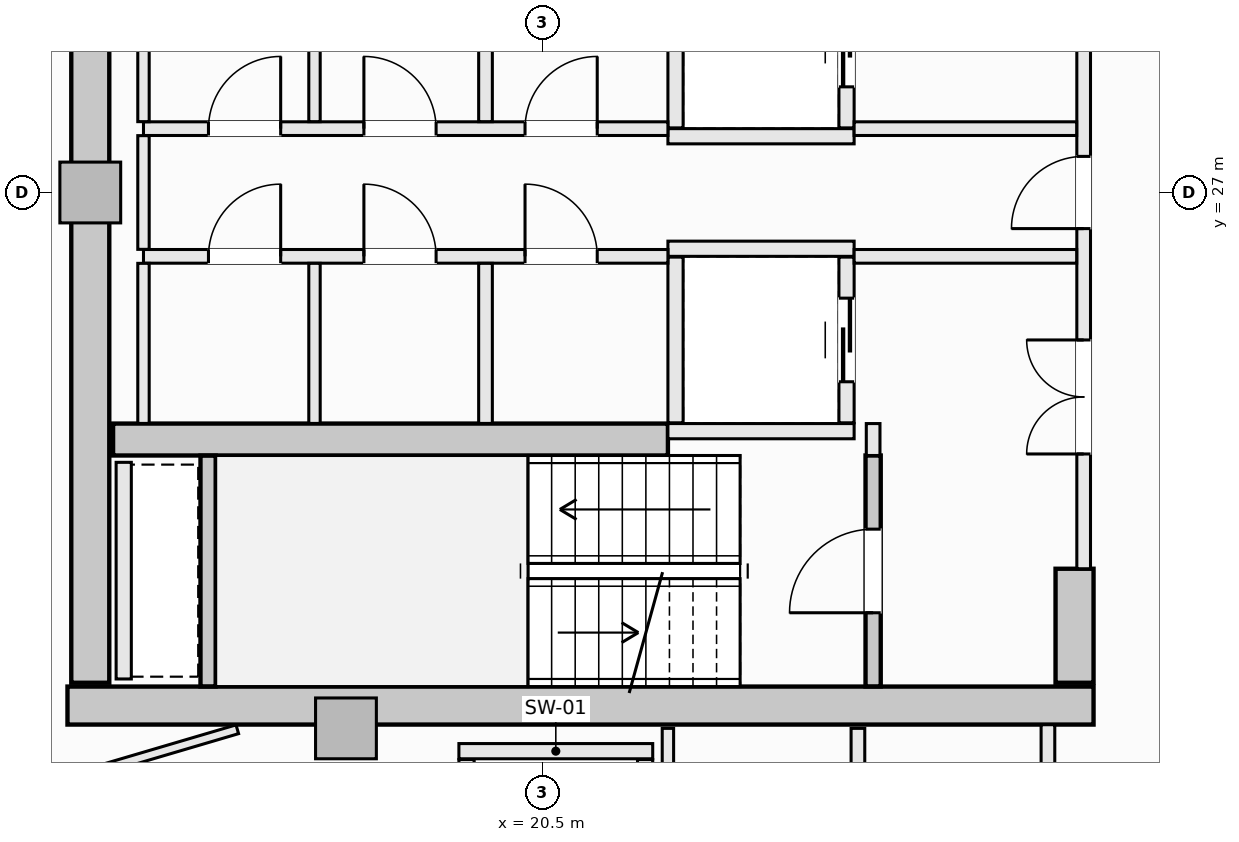
"""IFC4 building model, lengths in metres.
Left out: names, types, materials, properties, quantities, classifications, styles, units other than length and angle.
Written with IfcOpenShell. Run it as: python <this file> out.ifc"""

import sys

from ifc_helpers import new_model, si_unit, direction, frame, frame_2d, origin, origin_2d, place, context, subcontext, project, spatial, rectangle, extrude, element, fill, save


model = new_model("IFC4")
c1 = context("Model", 3, precision=1e-05, world=origin(), true_north=direction((0.0, 1.0)))
c2 = subcontext(c1, "Body", "Model", "MODEL_VIEW")
j1 = project(units=[si_unit("LENGTHUNIT", "METRE"), si_unit("PLANEANGLEUNIT", "RADIAN")], contexts=[c1])
p1 = place(None, origin())
s1 = spatial("IfcSite", under=j1, at=p1, CompositionType="ELEMENT")
p2 = place(p1, origin())
s2 = spatial("IfcBuilding", under=s1, at=p2, CompositionType="ELEMENT")
p3 = place(p2, frame((0.0, 0.0, 242.6)))
s3 = spatial("IfcBuildingStorey", under=s2, at=p3, CompositionType="ELEMENT", Elevation=242.6)
p4 = place(p3, frame((14.25, 20.25, -0.27), z_axis=(0.0, 0.0, 1.0), x_axis=(1.0, 0.0, 0.0)))
e1 = element("IfcWall", 1, at=p4, inside=s3, PredefinedType="SHEAR", context=c2, shape_type="SweptSolid", body=[
    extrude(rectangle(XDim=13.5, YDim=0.5, at=frame_2d((6.75, 0.0))), origin(), (0.0, 0.0, 1.0), 3.3),
])
p5 = place(p3, frame((14.55, 20.55, -0.27), z_axis=(0.0, 0.0, 1.0), x_axis=(0.0, 1.0, 0.0)))
e2 = element("IfcWall", 2, at=p5, inside=s3, PredefinedType="SHEAR", context=c2, shape_type="SweptSolid", body=[
    extrude(rectangle(XDim=12.9, YDim=0.5, at=frame_2d((6.45, 0.0))), origin(), (0.0, 0.0, 1.0), 3.3),
])
p6 = place(p3, frame((27.5, 20.55, -0.27), z_axis=(0.0, 0.0, 1.0), x_axis=(0.0, 1.0, 0.0)))
e3 = element("IfcWall", 3, at=p6, inside=s3, PredefinedType="SHEAR", context=c2, shape_type="SweptSolid", body=[
    extrude(rectangle(XDim=1.5, YDim=0.5, at=frame_2d((0.75, 0.0))), origin(), (0.0, 0.0, 1.0), 3.3),
])
p7 = place(p3, frame((14.85, 23.75, -0.27), z_axis=(0.0, 0.0, 1.0), x_axis=(1.0, 0.0, 0.0)))
e4 = element("IfcWall", 4, at=p7, inside=s3, PredefinedType="SHEAR", context=c2, shape_type="SweptSolid", body=[
    extrude(rectangle(XDim=7.3, YDim=0.42, at=frame_2d((3.65, 0.0))), origin(), (0.0, 0.0, 1.0), 3.3),
])
for number, where, z_axis, x_axis in (
    (5, (14.55, 27.0, -0.27), (0.0, 0.0, 1.0), (1.0, 0.0, 0.0)),
    (6, (17.914, 19.95, -0.27), (0.0, 0.0, 1.0), (1.0, 0.0, 0.0)),
):
    element("IfcColumn", number, at=place(p3, frame(where, z_axis=z_axis, x_axis=x_axis)), inside=s3, PredefinedType="PILASTER", context=c2, shape_type="SweptSolid", body=[
        extrude(rectangle(XDim=0.8, YDim=0.8, at=origin_2d()), origin(), (0.0, 0.0, 1.0), 3.3),
    ])
p8 = place(p3, frame((24.85, 20.502, -0.27), z_axis=(0.0, 0.0, 1.0), x_axis=(0.0, 1.0, 0.0)))
e7 = element("IfcWall", 7, at=p8, inside=s3, PredefinedType="SHEAR", context=c2, shape_type="SweptSolid", body=[
    extrude(rectangle(XDim=3.038, YDim=0.2, at=frame_2d((1.519, 0.0))), origin(), (0.0, 0.0, 1.0), 3.3),
])
p9 = place(p8, frame((0.969, 0.0, 0.27)))
e8 = element("IfcOpeningElement", 8, at=p9, cuts=e7, PredefinedType="OPENING", context=c2, shape_type="SweptSolid", body=[
    extrude(rectangle(XDim=1.1, YDim=2.15, at=frame_2d((0.55, 1.075))), frame((0.0, 0.11, 0.0), z_axis=(0.0, -1.0, 0.0), x_axis=(1.0, 0.0, 0.0)), (0.0, 0.0, 1.0), 0.22),
])
p10 = place(p3, frame((16.1, 20.502, -0.27), z_axis=(0.0, 0.0, 1.0), x_axis=(0.0, 1.0, 0.0)))
e9 = element("IfcWall", 9, at=p10, inside=s3, PredefinedType="SHEAR", context=c2, shape_type="SweptSolid", body=[
    extrude(rectangle(XDim=3.036, YDim=0.2, at=frame_2d((1.518, 0.0))), origin(), (0.0, 0.0, 1.0), 3.3),
])
p11 = place(p3, frame((22.15, 27.74, 0.0), z_axis=(0.0, 0.0, 1.0), x_axis=(1.0, 0.0, 0.0)))
e10 = element("IfcWall", 10, at=p11, inside=s3, PredefinedType="SOLIDWALL", context=c2, shape_type="SweptSolid", body=[
    extrude(rectangle(XDim=2.45, YDim=0.2, at=frame_2d((1.225, 0.0))), origin(), (0.0, 0.0, 1.0), 3.03),
])
p12 = place(p3, frame((22.25, 27.85, 0.0), z_axis=(0.0, 0.0, 1.0), x_axis=(0.0, 1.0, 0.0)))
e11 = element("IfcWall", 11, at=p12, inside=s3, PredefinedType="SOLIDWALL", context=c2, shape_type="SweptSolid", body=[
    extrude(rectangle(XDim=2.18, YDim=0.2, at=frame_2d((1.09, 0.0))), origin(), (0.0, 0.0, 1.0), 3.03),
])
p13 = place(p3, frame((24.5, 27.85, 0.0), z_axis=(0.0, 0.0, 1.0), x_axis=(0.0, 1.0, 0.0)))
e12 = element("IfcWall", 12, at=p13, inside=s3, PredefinedType="SOLIDWALL", context=c2, shape_type="SweptSolid", body=[
    extrude(rectangle(XDim=2.18, YDim=0.2, at=frame_2d((1.09, 0.0))), origin(), (0.0, 0.0, 1.0), 3.03),
])
p14 = place(p13, frame((0.54, 0.0, 0.0)))
e13 = element("IfcOpeningElement", 13, at=p14, cuts=e12, PredefinedType="OPENING", context=c2, shape_type="SweptSolid", body=[
    extrude(rectangle(XDim=1.1, YDim=2.2, at=frame_2d((0.55, 1.1))), frame((0.0, 0.11, 0.0), z_axis=(0.0, -1.0, 0.0), x_axis=(1.0, 0.0, 0.0)), (0.0, 0.0, 1.0), 0.22),
])
for number, where, z_axis, x_axis in (
    (14, (22.15, 26.26, 0.0), (0.0, 0.0, 1.0), (1.0, 0.0, 0.0)),
    (15, (22.15, 23.86, 0.0), (0.0, 0.0, 1.0), (1.0, 0.0, 0.0)),
):
    element("IfcWall", number, at=place(p3, frame(where, z_axis=z_axis, x_axis=x_axis)), inside=s3, PredefinedType="SOLIDWALL", context=c2, shape_type="SweptSolid", body=[
        extrude(rectangle(XDim=2.45, YDim=0.2, at=frame_2d((1.225, 0.0))), origin(), (0.0, 0.0, 1.0), 3.03),
    ])
p15 = place(p3, frame((22.25, 23.97, 0.0), z_axis=(0.0, 0.0, 1.0), x_axis=(0.0, 1.0, 0.0)))
e16 = element("IfcWall", 16, at=p15, inside=s3, PredefinedType="SOLIDWALL", context=c2, shape_type="SweptSolid", body=[
    extrude(rectangle(XDim=2.18, YDim=0.2, at=frame_2d((1.09, 0.0))), origin(), (0.0, 0.0, 1.0), 3.03),
])
p16 = place(p3, frame((24.5, 23.97, 0.0), z_axis=(0.0, 0.0, 1.0), x_axis=(0.0, 1.0, 0.0)))
e17 = element("IfcWall", 17, at=p16, inside=s3, PredefinedType="SOLIDWALL", context=c2, shape_type="SweptSolid", body=[
    extrude(rectangle(XDim=2.18, YDim=0.2, at=frame_2d((1.09, 0.0))), origin(), (0.0, 0.0, 1.0), 3.03),
])
p17 = place(p16, frame((0.54, 0.0, 0.0)))
e18 = element("IfcOpeningElement", 18, at=p17, cuts=e17, PredefinedType="OPENING", context=c2, shape_type="SweptSolid", body=[
    extrude(rectangle(XDim=1.1, YDim=2.2, at=frame_2d((0.55, 1.1))), frame((0.0, 0.11, 0.0), z_axis=(0.0, -1.0, 0.0), x_axis=(1.0, 0.0, 0.0)), (0.0, 0.0, 1.0), 0.22),
])
p18 = place(p3, frame((19.4, 19.65, 0.0), z_axis=(0.0, 0.0, 1.0), x_axis=(1.0, 0.0, 0.0)))
e19 = element("IfcWall", 19, at=p18, inside=s3, PredefinedType="SOLIDWALL", context=c2, shape_type="SweptSolid", body=[
    extrude(rectangle(XDim=2.55, YDim=0.2, at=frame_2d((1.275, 0.0))), origin(), (0.0, 0.0, 1.0), 3.03),
])
for number, where, z_axis, x_axis in (
    (20, (19.5, 17.01, 0.0), (0.0, 0.0, 1.0), (0.0, 1.0, 0.0)),
    (21, (21.85, 17.01, 0.0), (0.0, 0.0, 1.0), (0.0, 1.0, 0.0)),
):
    element("IfcWall", number, at=place(p3, frame(where, z_axis=z_axis, x_axis=x_axis)), inside=s3, PredefinedType="SOLIDWALL", context=c2, shape_type="SweptSolid", body=[
        extrude(rectangle(XDim=2.53, YDim=0.2, at=frame_2d((1.265, 0.0))), origin(), (0.0, 0.0, 1.0), 3.03),
    ])
p19 = place(p3, frame((14.99, 20.6, 0.0), z_axis=(0.0, 0.0, 1.0), x_axis=(0.0, 1.0, 0.0)))
e22 = element("IfcWall", 22, at=p19, inside=s3, PredefinedType="SOLIDWALL", context=c2, shape_type="SweptSolid", body=[
    extrude(rectangle(XDim=2.85, YDim=0.2, at=frame_2d((1.425, 0.0))), origin(), (0.0, 0.0, 1.0), 3.03),
])
p20 = place(p3, frame((24.85, 23.54, 0.0), z_axis=(0.0, 0.0, 1.0), x_axis=(0.0, 1.0, 0.0)))
e23 = element("IfcWall", 23, at=p20, inside=s3, PredefinedType="SOLIDWALL", context=c2, shape_type="SweptSolid", body=[
    extrude(rectangle(XDim=0.42, YDim=0.18, at=frame_2d((0.21, 0.0))), origin(), (0.0, 0.0, 1.0), 3.03),
])
p21 = place(p3, frame((27.62, 22.05, 0.0), z_axis=(0.0, 0.0, 1.0), x_axis=(0.0, 1.0, 0.0)))
e24 = element("IfcWall", 24, at=p21, inside=s3, PredefinedType="SOLIDWALL", context=c2, shape_type="SweptSolid", body=[
    extrude(rectangle(XDim=9.9, YDim=0.18, at=frame_2d((4.95, 0.0))), origin(), (0.0, 0.0, 1.0), 3.03),
])
p22 = place(p21, frame((4.475, 0.0, 0.0)))
e25 = element("IfcOpeningElement", 25, at=p22, cuts=e24, PredefinedType="OPENING", context=c2, shape_type="SweptSolid", body=[
    extrude(rectangle(XDim=0.95, YDim=2.1, at=frame_2d((0.475, 1.05))), frame((0.0, 0.1, 0.0), z_axis=(0.0, -1.0, 0.0), x_axis=(1.0, 0.0, 0.0)), (0.0, 0.0, 1.0), 0.2),
])
p23 = place(p21, frame((6.89, 0.0, 0.0)))
e26 = element("IfcOpeningElement", 26, at=p23, cuts=e24, PredefinedType="OPENING", context=c2, shape_type="SweptSolid", body=[
    extrude(rectangle(XDim=1.5, YDim=2.2, at=frame_2d((0.75, 1.1))), frame((0.0, 0.1, 0.0), z_axis=(0.0, -1.0, 0.0), x_axis=(1.0, 0.0, 0.0)), (0.0, 0.0, 1.0), 0.2),
])
p24 = place(p21, frame((1.51, 0.0, 0.0)))
e27 = element("IfcOpeningElement", 27, at=p24, cuts=e24, PredefinedType="OPENING", context=c2, shape_type="SweptSolid", body=[
    extrude(rectangle(XDim=1.5, YDim=2.2, at=frame_2d((0.75, 1.1))), frame((0.0, 0.1, 0.0), z_axis=(0.0, -1.0, 0.0), x_axis=(1.0, 0.0, 0.0)), (0.0, 0.0, 1.0), 0.2),
])
p25 = place(p3, frame((15.25, 27.84, 0.0), z_axis=(0.0, 0.0, 1.0), x_axis=(1.0, 0.0, 0.0)))
e28 = element("IfcWall", 28, at=p25, inside=s3, PredefinedType="SOLIDWALL", context=c2, shape_type="SweptSolid", body=[
    extrude(rectangle(XDim=6.9, YDim=0.18, at=frame_2d((3.45, 0.0))), origin(), (0.0, 0.0, 1.0), 3.03),
])
p26 = place(p25, frame((5.02, 0.0, 0.0)))
e29 = element("IfcOpeningElement", 29, at=p26, cuts=e28, PredefinedType="OPENING", context=c2, shape_type="SweptSolid", body=[
    extrude(rectangle(XDim=0.95, YDim=2.1, at=frame_2d((0.475, 1.05))), frame((0.0, 0.1, 0.0), z_axis=(0.0, -1.0, 0.0), x_axis=(1.0, 0.0, 0.0)), (0.0, 0.0, 1.0), 0.2),
])
p27 = place(p25, frame((0.855, 0.0, 0.0)))
e30 = element("IfcOpeningElement", 30, at=p27, cuts=e28, PredefinedType="OPENING", context=c2, shape_type="SweptSolid", body=[
    extrude(rectangle(XDim=0.95, YDim=2.1, at=frame_2d((0.475, 1.05))), frame((0.0, 0.1, 0.0), z_axis=(0.0, -1.0, 0.0), x_axis=(1.0, 0.0, 0.0)), (0.0, 0.0, 1.0), 0.2),
])
p28 = place(p25, frame((2.9, 0.0, 0.0)))
e31 = element("IfcOpeningElement", 31, at=p28, cuts=e28, PredefinedType="OPENING", context=c2, shape_type="SweptSolid", body=[
    extrude(rectangle(XDim=0.95, YDim=2.1, at=frame_2d((0.475, 1.05))), frame((0.0, 0.1, 0.0), z_axis=(0.0, -1.0, 0.0), x_axis=(1.0, 0.0, 0.0)), (0.0, 0.0, 1.0), 0.2),
])
p29 = place(p3, frame((24.6, 27.84, 0.0), z_axis=(0.0, 0.0, 1.0), x_axis=(1.0, 0.0, 0.0)))
e32 = element("IfcWall", 32, at=p29, inside=s3, PredefinedType="SOLIDWALL", context=c2, shape_type="SweptSolid", body=[
    extrude(rectangle(XDim=2.928, YDim=0.18, at=frame_2d((1.464, 0.0))), origin(), (0.0, 0.0, 1.0), 3.03),
])
p30 = place(p3, frame((15.25, 26.16, 0.0), z_axis=(0.0, 0.0, 1.0), x_axis=(1.0, 0.0, 0.0)))
e33 = element("IfcWall", 33, at=p30, inside=s3, PredefinedType="SOLIDWALL", context=c2, shape_type="SweptSolid", body=[
    extrude(rectangle(XDim=6.9, YDim=0.18, at=frame_2d((3.45, 0.0))), origin(), (0.0, 0.0, 1.0), 3.03),
])
p31 = place(p30, frame((5.02, 0.0, 0.0)))
e34 = element("IfcOpeningElement", 34, at=p31, cuts=e33, PredefinedType="OPENING", context=c2, shape_type="SweptSolid", body=[
    extrude(rectangle(XDim=0.95, YDim=2.1, at=frame_2d((0.475, 1.05))), frame((0.0, 0.1, 0.0), z_axis=(0.0, -1.0, 0.0), x_axis=(1.0, 0.0, 0.0)), (0.0, 0.0, 1.0), 0.2),
])
p32 = place(p30, frame((0.855, 0.0, 0.0)))
e35 = element("IfcOpeningElement", 35, at=p32, cuts=e33, PredefinedType="OPENING", context=c2, shape_type="SweptSolid", body=[
    extrude(rectangle(XDim=0.95, YDim=2.1, at=frame_2d((0.475, 1.05))), frame((0.0, 0.1, 0.0), z_axis=(0.0, -1.0, 0.0), x_axis=(1.0, 0.0, 0.0)), (0.0, 0.0, 1.0), 0.2),
])
p33 = place(p30, frame((2.9, 0.0, 0.0)))
e36 = element("IfcOpeningElement", 36, at=p33, cuts=e33, PredefinedType="OPENING", context=c2, shape_type="SweptSolid", body=[
    extrude(rectangle(XDim=0.95, YDim=2.1, at=frame_2d((0.475, 1.05))), frame((0.0, 0.1, 0.0), z_axis=(0.0, -1.0, 0.0), x_axis=(1.0, 0.0, 0.0)), (0.0, 0.0, 1.0), 0.2),
])
p34 = place(p3, frame((24.6, 26.16, 0.0), z_axis=(0.0, 0.0, 1.0), x_axis=(1.0, 0.0, 0.0)))
e37 = element("IfcWall", 37, at=p34, inside=s3, PredefinedType="SOLIDWALL", context=c2, shape_type="SweptSolid", body=[
    extrude(rectangle(XDim=2.928, YDim=0.18, at=frame_2d((1.464, 0.0))), origin(), (0.0, 0.0, 1.0), 3.03),
])
p35 = place(p3, frame((15.25, 23.962, 0.0), z_axis=(0.0, 0.0, 1.0), x_axis=(0.0, 1.0, 0.0)))
e38 = element("IfcWall", 38, at=p35, inside=s3, PredefinedType="PARTITIONING", context=c2, shape_type="SweptSolid", body=[
    extrude(rectangle(XDim=2.106, YDim=0.15, at=frame_2d((1.053, 0.0))), origin(), (0.0, 0.0, 1.0), 3.03),
])
p36 = place(p3, frame((15.25, 26.252, 0.0), z_axis=(0.0, 0.0, 1.0), x_axis=(0.0, 1.0, 0.0)))
e39 = element("IfcWall", 39, at=p36, inside=s3, PredefinedType="PARTITIONING", context=c2, shape_type="SweptSolid", body=[
    extrude(rectangle(XDim=1.496, YDim=0.15, at=frame_2d((0.748, 0.0))), origin(), (0.0, 0.0, 1.0), 3.03),
])
p37 = place(p3, frame((15.25, 27.932, 0.0), z_axis=(0.0, 0.0, 1.0), x_axis=(0.0, 1.0, 0.0)))
e40 = element("IfcWall", 40, at=p37, inside=s3, PredefinedType="PARTITIONING", context=c2, shape_type="SweptSolid", body=[
    extrude(rectangle(XDim=2.106, YDim=0.15, at=frame_2d((1.053, 0.0))), origin(), (0.0, 0.0, 1.0), 3.03),
])
for number, where, z_axis, x_axis in (
    (41, (19.75, 23.962, 0.0), (0.0, 0.0, 1.0), (0.0, 1.0, 0.0)),
    (42, (19.75, 27.932, 0.0), (0.0, 0.0, 1.0), (0.0, 1.0, 0.0)),
):
    element("IfcWall", number, at=place(p3, frame(where, z_axis=z_axis, x_axis=x_axis)), inside=s3, PredefinedType="SOLIDWALL", context=c2, shape_type="SweptSolid", body=[
        extrude(rectangle(XDim=2.106, YDim=0.18, at=frame_2d((1.053, 0.0))), origin(), (0.0, 0.0, 1.0), 3.03),
    ])
for number, where, z_axis, x_axis in (
    (43, (17.5, 23.962, 0.0), (0.0, 0.0, 1.0), (0.0, 1.0, 0.0)),
    (44, (17.5, 27.932, 0.0), (0.0, 0.0, 1.0), (0.0, 1.0, 0.0)),
):
    element("IfcWall", number, at=place(p3, frame(where, z_axis=z_axis, x_axis=x_axis)), inside=s3, PredefinedType="PARTITIONING", context=c2, shape_type="SweptSolid", body=[
        extrude(rectangle(XDim=2.106, YDim=0.15, at=frame_2d((1.053, 0.0))), origin(), (0.0, 0.0, 1.0), 3.03),
    ])
p38 = place(p3, frame((22.15, 17.142, 0.0), z_axis=(0.0, 0.0, 1.0), x_axis=(0.0, 1.0, 0.0)))
e45 = element("IfcWall", 45, at=p38, inside=s3, PredefinedType="PARTITIONING", context=c2, shape_type="SweptSolid", body=[
    extrude(rectangle(XDim=2.808, YDim=0.15, at=frame_2d((1.404, 0.0))), origin(), (0.0, 0.0, 1.0), 3.03),
])
p39 = place(p3, frame((24.65, 17.142, 0.0), z_axis=(0.0, 0.0, 1.0), x_axis=(0.0, 1.0, 0.0)))
e46 = element("IfcWall", 46, at=p39, inside=s3, PredefinedType="SOLIDWALL", context=c2, shape_type="SweptSolid", body=[
    extrude(rectangle(XDim=2.808, YDim=0.18, at=frame_2d((1.404, 0.0))), origin(), (0.0, 0.0, 1.0), 3.03),
])
p40 = place(p39, frame((0.929, 0.0, 0.0)))
e47 = element("IfcOpeningElement", 47, at=p40, cuts=e46, PredefinedType="OPENING", context=c2, shape_type="SweptSolid", body=[
    extrude(rectangle(XDim=0.95, YDim=2.1, at=frame_2d((0.475, 1.05))), frame((0.0, 0.1, 0.0), z_axis=(0.0, -1.0, 0.0), x_axis=(1.0, 0.0, 0.0)), (0.0, 0.0, 1.0), 0.2),
])
p41 = place(p3, frame((27.15, 17.142, 0.0), z_axis=(0.0, 0.0, 1.0), x_axis=(0.0, 1.0, 0.0)))
e48 = element("IfcWall", 48, at=p41, inside=s3, PredefinedType="SOLIDWALL", context=c2, shape_type="SweptSolid", body=[
    extrude(rectangle(XDim=2.856, YDim=0.18, at=frame_2d((1.428, 0.0))), origin(), (0.0, 0.0, 1.0), 3.03),
])
p42 = place(p41, frame((0.953, 0.0, 0.0)))
e49 = element("IfcOpeningElement", 49, at=p42, cuts=e48, PredefinedType="OPENING", context=c2, shape_type="SweptSolid", body=[
    extrude(rectangle(XDim=0.95, YDim=2.1, at=frame_2d((0.475, 1.05))), frame((0.0, 0.1, 0.0), z_axis=(0.0, -1.0, 0.0), x_axis=(1.0, 0.0, 0.0)), (0.0, 0.0, 1.0), 0.2),
])
p43 = place(p3, frame((10.692, 18.23, 0.0), z_axis=(0.0, 0.0, 1.0), x_axis=(0.959163130609, 0.282853475992, 0.0)))
e50 = element("IfcWall", 50, at=p43, inside=s3, PredefinedType="PARTITIONING", context=c2, shape_type="SweptSolid", body=[
    extrude(rectangle(XDim=6.039, YDim=0.12, at=frame_2d((3.02, 0.0))), origin(), (0.0, 0.0, 1.0), 2.77),
])
p44 = place(p9, origin())
e51 = element("IfcDoor", 51, at=p44, inside=s3, OperationType="SINGLE_SWING_LEFT", PredefinedType="DOOR", context=c2, shape_type="SweptSolid", body=[
    extrude(rectangle(XDim=1.1, YDim=2.15, at=frame_2d((0.55, 1.075))), frame((0.0, 0.025, 0.0), z_axis=(0.0, -1.0, 0.0), x_axis=(1.0, 0.0, 0.0)), (0.0, 0.0, 1.0), 0.05),
])
fill(e8, e51)
p45 = place(p14, origin())
e52 = element("IfcDoor", 52, at=p45, inside=s3, OperationType="SLIDING_TO_LEFT", PredefinedType="DOOR", context=c2, shape_type="SweptSolid", body=[
    extrude(rectangle(XDim=1.1, YDim=2.2, at=frame_2d((0.55, 1.1))), frame((0.0, 0.025, 0.0), z_axis=(0.0, -1.0, 0.0), x_axis=(1.0, 0.0, 0.0)), (0.0, 0.0, 1.0), 0.05),
])
fill(e13, e52)
p46 = place(p17, origin())
e53 = element("IfcDoor", 53, at=p46, inside=s3, OperationType="SLIDING_TO_LEFT", PredefinedType="DOOR", context=c2, shape_type="SweptSolid", body=[
    extrude(rectangle(XDim=1.1, YDim=2.2, at=frame_2d((0.55, 1.1))), frame((0.0, 0.025, 0.0), z_axis=(0.0, -1.0, 0.0), x_axis=(1.0, 0.0, 0.0)), (0.0, 0.0, 1.0), 0.05),
])
fill(e18, e53)
p47 = place(p22, origin())
e54 = element("IfcDoor", 54, at=p47, inside=s3, OperationType="SINGLE_SWING_LEFT", PredefinedType="DOOR", context=c2, shape_type="SweptSolid", body=[
    extrude(rectangle(XDim=0.95, YDim=2.1, at=frame_2d((0.475, 1.05))), frame((0.0, 0.025, 0.0), z_axis=(0.0, -1.0, 0.0), x_axis=(1.0, 0.0, 0.0)), (0.0, 0.0, 1.0), 0.05),
])
fill(e25, e54)
p48 = place(p24, origin())
e55 = element("IfcDoor", 55, at=p48, inside=s3, OperationType="DOUBLE_DOOR_SINGLE_SWING", PredefinedType="DOOR", context=c2, shape_type="SweptSolid", body=[
    extrude(rectangle(XDim=1.5, YDim=2.2, at=frame_2d((0.75, 1.1))), frame((0.0, 0.025, 0.0), z_axis=(0.0, -1.0, 0.0), x_axis=(1.0, 0.0, 0.0)), (0.0, 0.0, 1.0), 0.05),
])
fill(e27, e55)
p49 = place(p26, origin())
e56 = element("IfcDoor", 56, at=p49, inside=s3, OperationType="SINGLE_SWING_RIGHT", PredefinedType="DOOR", context=c2, shape_type="SweptSolid", body=[
    extrude(rectangle(XDim=0.95, YDim=2.1, at=frame_2d((0.475, 1.05))), frame((0.0, 0.025, 0.0), z_axis=(0.0, -1.0, 0.0), x_axis=(1.0, 0.0, 0.0)), (0.0, 0.0, 1.0), 0.05),
])
fill(e29, e56)
p50 = place(p31, origin())
e57 = element("IfcDoor", 57, at=p50, inside=s3, OperationType="SINGLE_SWING_LEFT", PredefinedType="DOOR", context=c2, shape_type="SweptSolid", body=[
    extrude(rectangle(XDim=0.95, YDim=2.1, at=frame_2d((0.475, 1.05))), frame((0.0, 0.025, 0.0), z_axis=(0.0, -1.0, 0.0), x_axis=(1.0, 0.0, 0.0)), (0.0, 0.0, 1.0), 0.05),
])
fill(e34, e57)
p51 = place(p27, origin())
e58 = element("IfcDoor", 58, at=p51, inside=s3, OperationType="SINGLE_SWING_RIGHT", PredefinedType="DOOR", context=c2, shape_type="SweptSolid", body=[
    extrude(rectangle(XDim=0.95, YDim=2.1, at=frame_2d((0.475, 1.05))), frame((0.0, 0.025, 0.0), z_axis=(0.0, -1.0, 0.0), x_axis=(1.0, 0.0, 0.0)), (0.0, 0.0, 1.0), 0.05),
])
fill(e30, e58)
p52 = place(p28, origin())
e59 = element("IfcDoor", 59, at=p52, inside=s3, OperationType="SINGLE_SWING_LEFT", PredefinedType="DOOR", context=c2, shape_type="SweptSolid", body=[
    extrude(rectangle(XDim=0.95, YDim=2.1, at=frame_2d((0.475, 1.05))), frame((0.0, 0.025, 0.0), z_axis=(0.0, -1.0, 0.0), x_axis=(1.0, 0.0, 0.0)), (0.0, 0.0, 1.0), 0.05),
])
fill(e31, e59)
p53 = place(p32, origin())
e60 = element("IfcDoor", 60, at=p53, inside=s3, OperationType="SINGLE_SWING_RIGHT", PredefinedType="DOOR", context=c2, shape_type="SweptSolid", body=[
    extrude(rectangle(XDim=0.95, YDim=2.1, at=frame_2d((0.475, 1.05))), frame((0.0, 0.025, 0.0), z_axis=(0.0, -1.0, 0.0), x_axis=(1.0, 0.0, 0.0)), (0.0, 0.0, 1.0), 0.05),
])
fill(e35, e60)
p54 = place(p33, origin())
e61 = element("IfcDoor", 61, at=p54, inside=s3, OperationType="SINGLE_SWING_LEFT", PredefinedType="DOOR", context=c2, shape_type="SweptSolid", body=[
    extrude(rectangle(XDim=0.95, YDim=2.1, at=frame_2d((0.475, 1.05))), frame((0.0, 0.025, 0.0), z_axis=(0.0, -1.0, 0.0), x_axis=(1.0, 0.0, 0.0)), (0.0, 0.0, 1.0), 0.05),
])
fill(e36, e61)
save(model, sys.argv[1])
